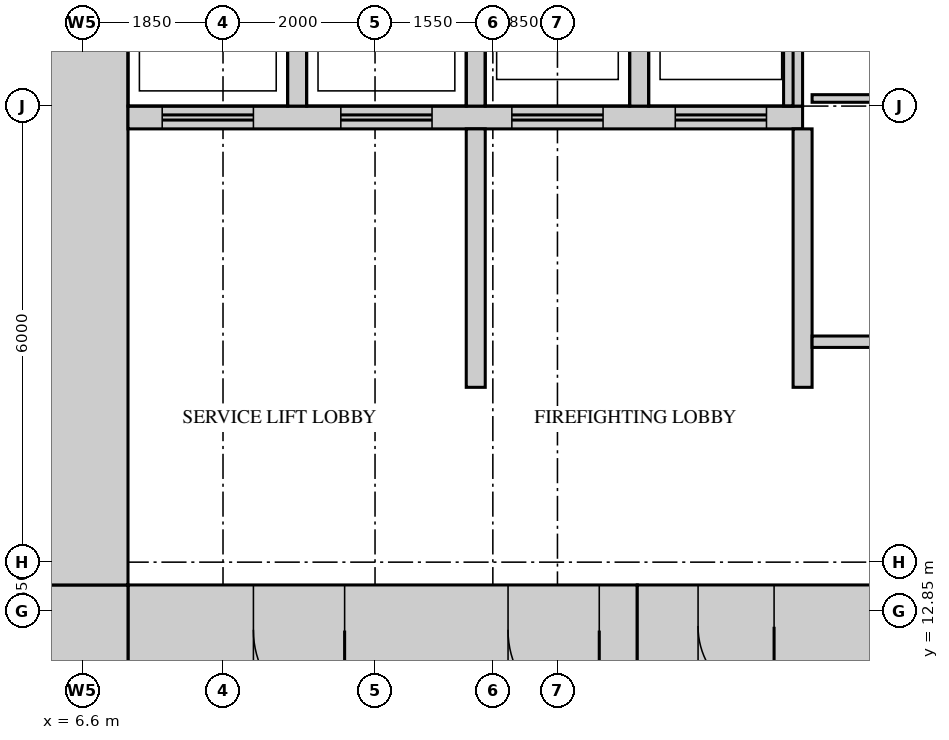
"""IFC4 building model, lengths in metres.
Left out: names, types, materials, properties, quantities, classifications, styles, units other than length and angle.
Written with IfcOpenShell. Run it as: python <this file> out.ifc"""

import sys

from ifc_helpers import new_model, si_unit, direction, frame, frame_2d, origin, place, context, subcontext, project, spatial, rectangle, extrude, source, transform, mapped, element, fill, save


model = new_model("IFC4")
c1 = context("Model", 3, precision=1e-05, world=origin(), true_north=direction((0.0, 1.0)))
c2 = subcontext(c1, "Body", "Model", "MODEL_VIEW")
j1 = project(units=[si_unit("LENGTHUNIT", "METRE"), si_unit("PLANEANGLEUNIT", "RADIAN")], contexts=[c1])
p1 = place(None, origin())
s1 = spatial("IfcSite", under=j1, at=p1, CompositionType="ELEMENT")
p2 = place(p1, origin())
s2 = spatial("IfcBuilding", under=s1, at=p2, CompositionType="ELEMENT")
p3 = place(p2, frame((0.0, 0.0, 46.5)))
s3 = spatial("IfcBuildingStorey", under=s2, at=p3, CompositionType="ELEMENT", Elevation=46.5)
m1 = source(origin(), c2, "Body", "SweptSolid", [
    extrude(rectangle(XDim=6.7, YDim=1.2, at=frame_2d((3.35, 0.0))), origin(), (0.0, 0.0, 1.0), 4.2),
])
p4 = place(p3, frame((7.2, 12.6, 0.0), z_axis=(0.0, 0.0, 1.0), x_axis=(1.0, 0.0, 0.0)))
e1 = element("IfcWall", 1, at=p4, inside=s3, PredefinedType="SHEAR", context=c2, shape_type="MappedRepresentation", body=[
    mapped(m1, transform((0.0, 0.0, 0.0))),
])
m2 = source(origin(), c2, "Body", "SweptSolid", [
    extrude(rectangle(XDim=1.2, YDim=2.1, at=frame_2d((0.6, 1.05))), frame((0.0, 0.61, 0.0), z_axis=(0.0, -1.0, 0.0), x_axis=(1.0, 0.0, 0.0)), (0.0, 0.0, 1.0), 1.22),
])
p5 = place(p4, frame((5.0, 0.0, 0.0)))
e2 = element("IfcOpeningElement", 2, at=p5, cuts=e1, PredefinedType="OPENING", context=c2, shape_type="MappedRepresentation", body=[
    mapped(m2, transform((0.0, 0.0, 0.0))),
])
p6 = place(p4, frame((1.65, 0.0, 0.0)))
e3 = element("IfcOpeningElement", 3, at=p6, cuts=e1, PredefinedType="OPENING", context=c2, shape_type="MappedRepresentation", body=[
    mapped(m2, transform((0.0, 0.0, 0.0))),
])
m3 = source(origin(), c2, "Body", "SweptSolid", [
    extrude(rectangle(XDim=7.2, YDim=1.1, at=frame_2d((3.6, 0.0))), origin(), (0.0, 0.0, 1.0), 4.2),
])
p7 = place(p3, frame((13.9, 12.65, 0.0), z_axis=(0.0, 0.0, 1.0), x_axis=(1.0, 0.0, 0.0)))
e4 = element("IfcWall", 4, at=p7, inside=s3, PredefinedType="SHEAR", context=c2, shape_type="MappedRepresentation", body=[
    mapped(m3, transform((0.0, 0.0, 0.0))),
])
m4 = source(origin(), c2, "Body", "SweptSolid", [
    extrude(rectangle(XDim=1.0, YDim=2.1, at=frame_2d((0.5, 1.05))), frame((0.0, 0.56, 0.0), z_axis=(0.0, -1.0, 0.0), x_axis=(1.0, 0.0, 0.0)), (0.0, 0.0, 1.0), 1.12),
])
p8 = place(p7, frame((0.8, 0.0, 0.0)))
e5 = element("IfcOpeningElement", 5, at=p8, cuts=e4, PredefinedType="OPENING", context=c2, shape_type="MappedRepresentation", body=[
    mapped(m4, transform((0.0, 0.0, 0.0))),
])
m5 = source(origin(), c2, "Body", "SweptSolid", [
    extrude(rectangle(XDim=1.2, YDim=1.2, at=frame_2d((0.6, 0.0))), origin(), (0.0, 0.0, 1.0), 4.2),
])
p9 = place(p3, frame((6.0, 12.6, 0.0), z_axis=(0.0, 0.0, 1.0), x_axis=(1.0, 0.0, 0.0)))
e6 = element("IfcWall", 6, at=p9, inside=s3, PredefinedType="SHEAR", context=c2, shape_type="MappedRepresentation", body=[
    mapped(m5, transform((0.0, 0.0, 0.0))),
])
m6 = source(origin(), c2, "Body", "SweptSolid", [
    extrude(rectangle(XDim=27.6, YDim=1.2, at=frame_2d((13.8, 0.0))), origin(), (0.0, 0.0, 1.0), 4.2),
])
p10 = place(p3, frame((6.6, 13.2, 0.0), z_axis=(0.0, 0.0, 1.0), x_axis=(0.0, 1.0, 0.0)))
e7 = element("IfcWall", 7, at=p10, inside=s3, PredefinedType="SHEAR", context=c2, shape_type="MappedRepresentation", body=[
    mapped(m6, transform((0.0, 0.0, 0.0))),
])
m7 = source(origin(), c2, "Body", "SweptSolid", [
    extrude(rectangle(XDim=8.875, YDim=0.3, at=frame_2d((4.438, 0.0))), origin(), (0.0, 0.0, 1.0), 4.2),
])
p11 = place(p3, frame((7.2, 19.35, 0.0), z_axis=(0.0, 0.0, 1.0), x_axis=(1.0, 0.0, 0.0)))
e8 = element("IfcWall", 8, at=p11, inside=s3, PredefinedType="STANDARD", context=c2, shape_type="MappedRepresentation", body=[
    mapped(m7, transform((0.0, 0.0, 0.0))),
])
m8 = source(origin(), c2, "Body", "SweptSolid", [
    extrude(rectangle(XDim=1.2, YDim=2.1, at=frame_2d((0.6, 1.05))), frame((0.0, 0.16, 0.0), z_axis=(0.0, -1.0, 0.0), x_axis=(1.0, 0.0, 0.0)), (0.0, 0.0, 1.0), 0.32),
])
p12 = place(p11, frame((0.45, 0.0, 0.0)))
e9 = element("IfcOpeningElement", 9, at=p12, cuts=e8, PredefinedType="OPENING", context=c2, shape_type="MappedRepresentation", body=[
    mapped(m8, transform((0.0, 0.0, 0.0))),
])
p13 = place(p11, frame((2.8, 0.0, 0.0)))
e10 = element("IfcOpeningElement", 10, at=p13, cuts=e8, PredefinedType="OPENING", context=c2, shape_type="MappedRepresentation", body=[
    mapped(m8, transform((0.0, 0.0, 0.0))),
])
p14 = place(p11, frame((5.05, 0.0, 0.0)))
e11 = element("IfcOpeningElement", 11, at=p14, cuts=e8, PredefinedType="OPENING", context=c2, shape_type="MappedRepresentation", body=[
    mapped(m8, transform((0.0, 0.0, 0.0))),
])
p15 = place(p11, frame((7.2, 0.0, 0.0)))
e12 = element("IfcOpeningElement", 12, at=p15, cuts=e8, PredefinedType="OPENING", context=c2, shape_type="MappedRepresentation", body=[
    mapped(m8, transform((0.0, 0.0, 0.0))),
])
m9 = source(origin(), c2, "Body", "SweptSolid", [
    extrude(rectangle(XDim=3.1, YDim=0.25, at=frame_2d((1.55, 0.0))), origin(), (0.0, 0.0, 1.0), 4.2),
])
for number, where, z_axis, x_axis in (
    (13, (9.425, 19.5, 0.0), (0.0, 0.0, 1.0), (0.0, 1.0, 0.0)),
    (14, (11.775, 19.5, 0.0), (0.0, 0.0, 1.0), (0.0, 1.0, 0.0)),
    (15, (13.925, 19.5, 0.0), (0.0, 0.0, 1.0), (0.0, 1.0, 0.0)),
    (16, (15.95, 19.5, 0.0), (0.0, 0.0, 1.0), (0.0, 1.0, 0.0)),
):
    element("IfcWall", number, at=place(p3, frame(where, z_axis=z_axis, x_axis=x_axis)), inside=s3, PredefinedType="STANDARD", context=c2, shape_type="MappedRepresentation", body=[
        mapped(m9, transform((0.0, 0.0, 0.0))),
    ])
m10 = source(origin(), c2, "Body", "SweptSolid", [
    extrude(rectangle(XDim=3.4, YDim=0.25, at=frame_2d((1.7, 0.0))), origin(), (0.0, 0.0, 1.0), 4.2),
])
for number, where, z_axis, x_axis in (
    (17, (16.075, 15.8, 0.0), (0.0, 0.0, 1.0), (0.0, 1.0, 0.0)),
    (18, (11.775, 15.8, 0.0), (0.0, 0.0, 1.0), (0.0, 1.0, 0.0)),
):
    element("IfcWall", number, at=place(p3, frame(where, z_axis=z_axis, x_axis=x_axis)), inside=s3, PredefinedType="STANDARD", context=c2, shape_type="MappedRepresentation", body=[
        mapped(m10, transform((0.0, 0.0, 0.0))),
    ])
m11 = source(origin(), c2, "Body", "SweptSolid", [
    extrude(rectangle(XDim=6.6, YDim=0.15, at=frame_2d((3.3, 0.0))), origin(), (0.0, 0.0, 1.0), 4.3),
])
p16 = place(p3, frame((16.2, 16.4, 0.0), z_axis=(0.0, 0.0, 1.0), x_axis=(1.0, 0.0, 0.0)))
e19 = element("IfcWall", 19, at=p16, inside=s3, PredefinedType="PARTITIONING", context=c2, shape_type="MappedRepresentation", body=[
    mapped(m11, transform((0.0, 0.0, 0.0))),
])
m12 = source(origin(), c2, "Body", "SweptSolid", [
    extrude(rectangle(XDim=6.6, YDim=0.1, at=frame_2d((3.3, 0.0))), origin(), (0.0, 0.0, 1.0), 4.3),
])
p17 = place(p3, frame((16.2, 19.6, 0.0), z_axis=(0.0, 0.0, 1.0), x_axis=(1.0, 0.0, 0.0)))
e20 = element("IfcWall", 20, at=p17, inside=s3, PredefinedType="PARTITIONING", context=c2, shape_type="MappedRepresentation", body=[
    mapped(m12, transform((0.0, 0.0, 0.0))),
])
m13 = source(origin(), c2, "Body", "SweptSolid", [
    extrude(rectangle(XDim=1.2, YDim=2.1, at=frame_2d((0.6, 1.05))), frame((0.0, 0.55, 0.0), z_axis=(0.0, -1.0, 0.0), x_axis=(1.0, 0.0, 0.0)), (0.0, 0.0, 1.0), 1.1),
])
p18 = place(p5, origin())
e21 = element("IfcDoor", 21, at=p18, inside=s3, OperationType="SINGLE_SWING_RIGHT", PredefinedType="DOOR", context=c2, shape_type="MappedRepresentation", body=[
    mapped(m13, transform((0.0, 0.0, 0.0))),
])
fill(e2, e21)
p19 = place(p6, origin())
e22 = element("IfcDoor", 22, at=p19, inside=s3, OperationType="SINGLE_SWING_RIGHT", PredefinedType="DOOR", context=c2, shape_type="MappedRepresentation", body=[
    mapped(m13, transform((0.0, 0.0, 0.0))),
])
fill(e3, e22)
m14 = source(origin(), c2, "Body", "SweptSolid", [
    extrude(rectangle(XDim=1.0, YDim=2.1, at=frame_2d((0.5, 1.05))), frame((0.0, 0.5, 0.0), z_axis=(0.0, -1.0, 0.0), x_axis=(1.0, 0.0, 0.0)), (0.0, 0.0, 1.0), 1.0),
])
p20 = place(p8, origin())
e23 = element("IfcDoor", 23, at=p20, inside=s3, OperationType="SINGLE_SWING_RIGHT", PredefinedType="DOOR", context=c2, shape_type="MappedRepresentation", body=[
    mapped(m14, transform((0.0, 0.0, 0.0))),
])
fill(e5, e23)
m15 = source(origin(), c2, "Body", "SweptSolid", [
    extrude(rectangle(XDim=1.2, YDim=2.1, at=frame_2d((0.6, 1.05))), frame((0.0, 0.025, 0.0), z_axis=(0.0, -1.0, 0.0), x_axis=(1.0, 0.0, 0.0)), (0.0, 0.0, 1.0), 0.05),
])
p21 = place(p12, origin())
e24 = element("IfcDoor", 24, at=p21, inside=s3, OperationType="DOUBLE_DOOR_SLIDING", PredefinedType="DOOR", context=c2, shape_type="MappedRepresentation", body=[
    mapped(m15, transform((0.0, 0.0, 0.0))),
])
fill(e9, e24)
p22 = place(p13, origin())
e25 = element("IfcDoor", 25, at=p22, inside=s3, OperationType="DOUBLE_DOOR_SLIDING", PredefinedType="DOOR", context=c2, shape_type="MappedRepresentation", body=[
    mapped(m15, transform((0.0, 0.0, 0.0))),
])
fill(e10, e25)
p23 = place(p14, origin())
e26 = element("IfcDoor", 26, at=p23, inside=s3, OperationType="DOUBLE_DOOR_SLIDING", PredefinedType="DOOR", context=c2, shape_type="MappedRepresentation", body=[
    mapped(m15, transform((0.0, 0.0, 0.0))),
])
fill(e11, e26)
p24 = place(p15, origin())
e27 = element("IfcDoor", 27, at=p24, inside=s3, OperationType="DOUBLE_DOOR_SLIDING", PredefinedType="DOOR", context=c2, shape_type="MappedRepresentation", body=[
    mapped(m15, transform((0.0, 0.0, 0.0))),
])
fill(e12, e27)
save(model, sys.argv[1])
